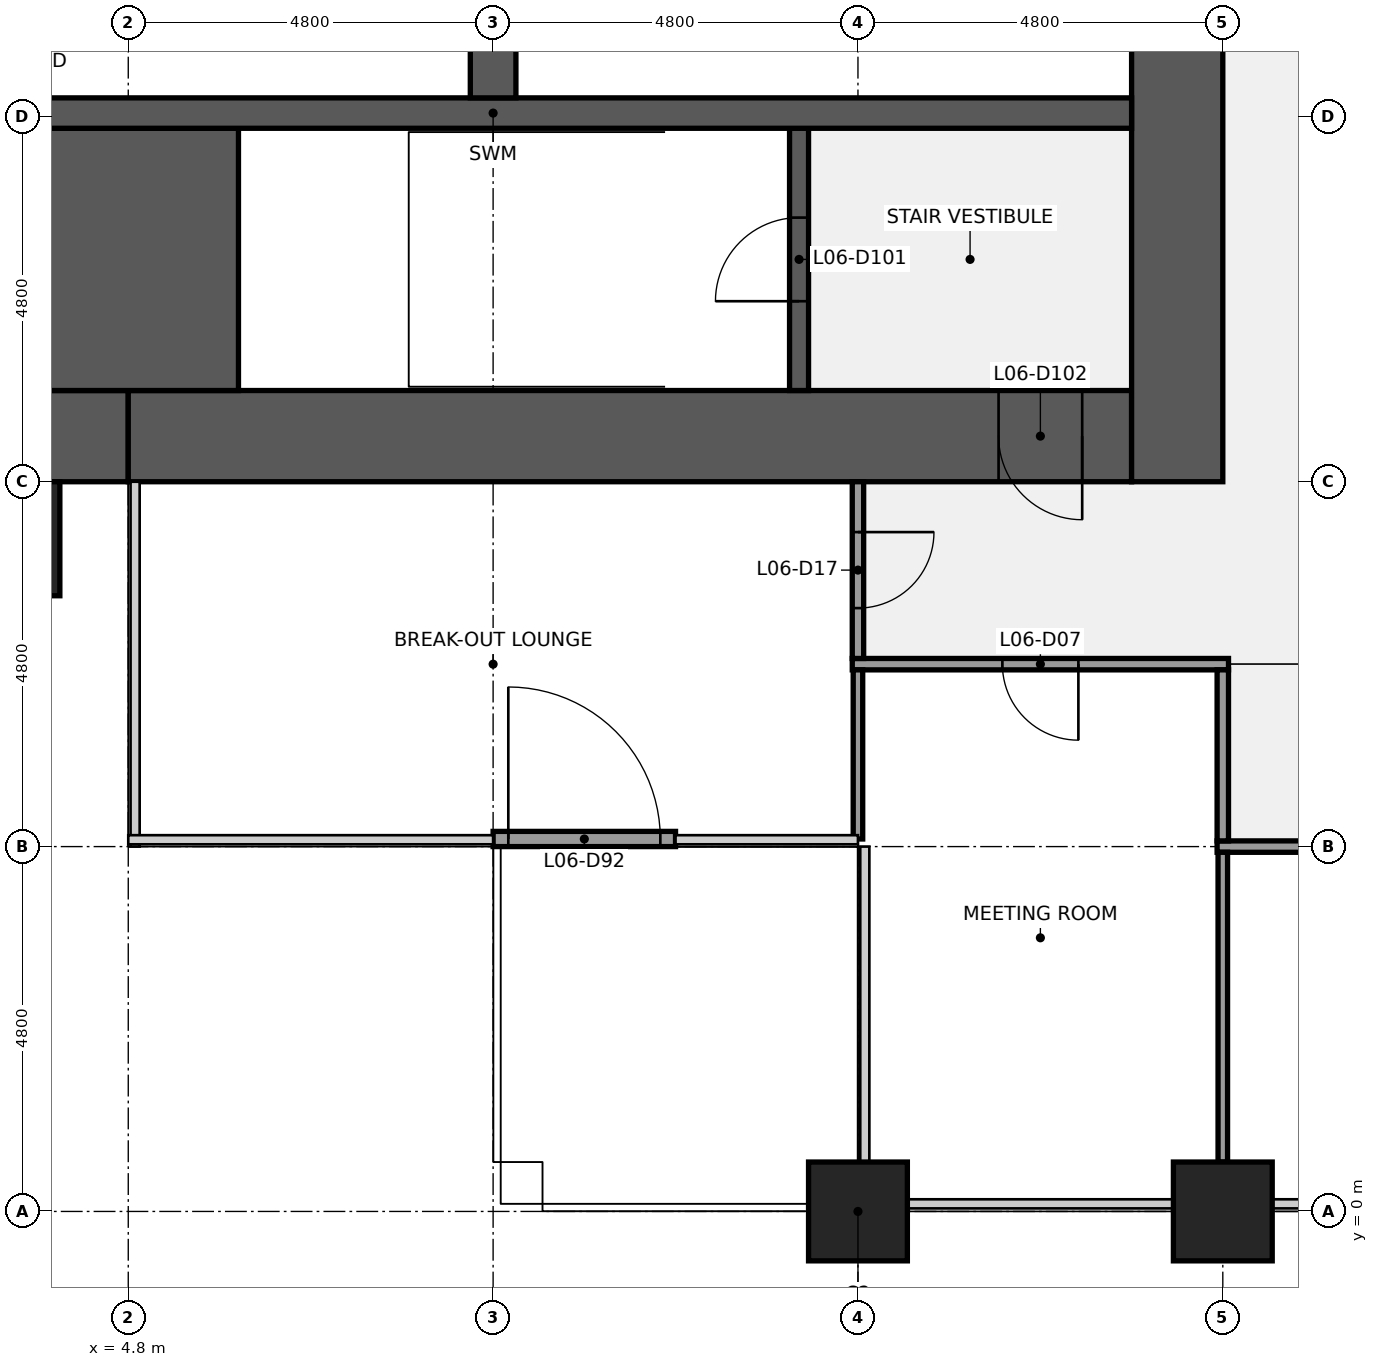
"""IFC4 building model, lengths in metres.
Left out: names, types, materials, properties, quantities, classifications, styles, units other than length and angle.
Written with IfcOpenShell. Run it as: python <this file> out.ifc"""

import sys

from ifc_helpers import new_model, si_unit, direction, frame, frame_2d, origin, origin_2d, place, context, subcontext, project, spatial, rectangle, extrude, element, fill, save


model = new_model("IFC4")
c1 = context("Model", 3, precision=1e-05, world=origin(), true_north=direction((0.0, 1.0)))
c2 = subcontext(c1, "Body", "Model", "MODEL_VIEW")
j1 = project(units=[si_unit("LENGTHUNIT", "METRE"), si_unit("PLANEANGLEUNIT", "RADIAN")], contexts=[c1])
p1 = place(None, origin())
s1 = spatial("IfcSite", under=j1, at=p1, CompositionType="ELEMENT")
p2 = place(p1, origin())
s2 = spatial("IfcBuilding", under=s1, at=p2, CompositionType="ELEMENT")
p3 = place(p2, frame((0.0, 0.0, 34.6)))
s3 = spatial("IfcBuildingStorey", under=s2, at=p3, CompositionType="ELEMENT", Elevation=34.6)
for number, where, z_axis, x_axis in (
    (1, (14.4, 0.0, 0.0), (0.0, 0.0, 1.0), (1.0, 0.0, 0.0)),
    (2, (19.2, 0.0, 0.0), (0.0, 0.0, 1.0), (1.0, 0.0, 0.0)),
):
    element("IfcColumn", number, at=place(p3, frame(where, z_axis=z_axis, x_axis=x_axis)), inside=s3, PredefinedType="COLUMN", context=c2, shape_type="SweptSolid", body=[
        extrude(rectangle(XDim=1.3, YDim=1.3, at=origin_2d()), origin(), (0.0, 0.0, 1.0), 4.4),
    ])
p4 = place(p3, frame((4.8, 10.2, 0.0), z_axis=(0.0, 0.0, 1.0), x_axis=(-1.0, 0.0, 0.0)))
e3 = element("IfcWall", 3, at=p4, inside=s3, PredefinedType="SHEAR", context=c2, shape_type="SweptSolid", body=[
    extrude(rectangle(XDim=3.6, YDim=1.2, at=frame_2d((1.8, 0.0))), origin(), (0.0, 0.0, 1.0), 4.24),
])
p5 = place(p3, frame((18.0, 10.2, 0.0), z_axis=(0.0, 0.0, 1.0), x_axis=(-1.0, 0.0, 0.0)))
e4 = element("IfcWall", 4, at=p5, inside=s3, PredefinedType="SHEAR", context=c2, shape_type="SweptSolid", body=[
    extrude(rectangle(XDim=13.2, YDim=1.2, at=frame_2d((6.6, 0.0))), origin(), (0.0, 0.0, 1.0), 4.24),
])
p6 = place(p5, frame((0.65, 0.0, 0.0)))
e5 = element("IfcOpeningElement", 5, at=p6, cuts=e4, PredefinedType="OPENING", context=c2, shape_type="SweptSolid", body=[
    extrude(rectangle(XDim=1.1, YDim=2.1, at=frame_2d((0.55, 1.05))), frame((0.0, 0.61, 0.0), z_axis=(0.0, -1.0, 0.0), x_axis=(1.0, 0.0, 0.0)), (0.0, 0.0, 1.0), 1.22),
])
p7 = place(p3, frame((18.6, 38.4, 0.0), z_axis=(0.0, 0.0, 1.0), x_axis=(0.0, -1.0, 0.0)))
e6 = element("IfcWall", 6, at=p7, inside=s3, PredefinedType="SHEAR", context=c2, shape_type="SweptSolid", body=[
    extrude(rectangle(XDim=28.8, YDim=1.2, at=frame_2d((14.4, 0.0))), origin(), (0.0, 0.0, 1.0), 4.24),
])
p8 = place(p7, frame((18.3, 0.0, 0.0)))
e7 = element("IfcOpeningElement", 7, at=p8, cuts=e6, PredefinedType="OPENING", context=c2, shape_type="SweptSolid", body=[
    extrude(rectangle(XDim=1.8, YDim=2.1, at=frame_2d((0.9, 1.05))), frame((0.0, 0.61, 0.0), z_axis=(0.0, -1.0, 0.0), x_axis=(1.0, 0.0, 0.0)), (0.0, 0.0, 1.0), 1.22),
])
p9 = place(p7, frame((8.7, 0.0, 0.0)))
e8 = element("IfcOpeningElement", 8, at=p9, cuts=e6, PredefinedType="OPENING", context=c2, shape_type="SweptSolid", body=[
    extrude(rectangle(XDim=1.8, YDim=2.1, at=frame_2d((0.9, 1.05))), frame((0.0, 0.61, 0.0), z_axis=(0.0, -1.0, 0.0), x_axis=(1.0, 0.0, 0.0)), (0.0, 0.0, 1.0), 1.22),
])
p10 = place(p3, frame((1.2, 12.525, 0.0), z_axis=(0.0, 0.0, 1.0), x_axis=(1.0, 0.0, 0.0)))
e9 = element("IfcWall", 9, at=p10, inside=s3, PredefinedType="SHEAR", context=c2, shape_type="SweptSolid", body=[
    extrude(rectangle(XDim=5.05, YDim=3.45, at=frame_2d((2.525, 0.0))), origin(), (0.0, 0.0, 1.0), 4.24),
])
p11 = place(p3, frame((13.625, 10.8, 0.0), z_axis=(0.0, 0.0, 1.0), x_axis=(0.0, 1.0, 0.0)))
e10 = element("IfcWall", 10, at=p11, inside=s3, PredefinedType="SHEAR", context=c2, shape_type="SweptSolid", body=[
    extrude(rectangle(XDim=3.45, YDim=0.25, at=frame_2d((1.725, 0.0))), origin(), (0.0, 0.0, 1.0), 4.24),
])
p12 = place(p11, frame((1.175, 0.0, 0.0)))
e11 = element("IfcOpeningElement", 11, at=p12, cuts=e10, PredefinedType="OPENING", context=c2, shape_type="SweptSolid", body=[
    extrude(rectangle(XDim=1.1, YDim=2.1, at=frame_2d((0.55, 1.05))), frame((0.0, 0.135, 0.0), z_axis=(0.0, -1.0, 0.0), x_axis=(1.0, 0.0, 0.0)), (0.0, 0.0, 1.0), 0.27),
])
p13 = place(p3, frame((1.2, 14.45, 0.0), z_axis=(0.0, 0.0, 1.0), x_axis=(1.0, 0.0, 0.0)))
e12 = element("IfcWall", 12, at=p13, inside=s3, PredefinedType="SHEAR", context=c2, shape_type="SweptSolid", body=[
    extrude(rectangle(XDim=16.8, YDim=0.4, at=frame_2d((8.4, 0.0))), origin(), (0.0, 0.0, 1.0), 4.24),
])
p14 = place(p3, frame((9.6, 14.65, 0.0), z_axis=(0.0, 0.0, 1.0), x_axis=(0.0, 1.0, 0.0)))
e13 = element("IfcWall", 13, at=p14, inside=s3, PredefinedType="SHEAR", context=c2, shape_type="SweptSolid", body=[
    extrude(rectangle(XDim=2.6, YDim=0.6, at=frame_2d((1.3, 0.0))), origin(), (0.0, 0.0, 1.0), 4.24),
])
p15 = place(p3, frame((19.125, 4.8, 0.0), z_axis=(0.0, 0.0, 1.0), x_axis=(1.0, 0.0, 0.0)))
e14 = element("IfcWall", 14, at=p15, inside=s3, PredefinedType="PARTITIONING", context=c2, shape_type="SweptSolid", body=[
    extrude(rectangle(XDim=19.35, YDim=0.15, at=frame_2d((9.675, 0.0))), origin(), (0.0, 0.0, 1.0), 3.27),
])
p16 = place(p15, frame((5.575, 0.0, 0.0)))
e15 = element("IfcOpeningElement", 15, at=p16, cuts=e14, PredefinedType="OPENING", context=c2, shape_type="SweptSolid", body=[
    extrude(rectangle(XDim=1.0, YDim=2.1, at=frame_2d((0.5, 1.05))), frame((0.0, 0.085, 0.0), z_axis=(0.0, -1.0, 0.0), x_axis=(1.0, 0.0, 0.0)), (0.0, 0.0, 1.0), 0.17),
])
p17 = place(p15, frame((13.975, 0.0, 0.0)))
e16 = element("IfcOpeningElement", 16, at=p17, cuts=e14, PredefinedType="OPENING", context=c2, shape_type="SweptSolid", body=[
    extrude(rectangle(XDim=1.0, YDim=2.1, at=frame_2d((0.5, 1.05))), frame((0.0, 0.085, 0.0), z_axis=(0.0, -1.0, 0.0), x_axis=(1.0, 0.0, 0.0)), (0.0, 0.0, 1.0), 0.17),
])
p18 = place(p15, frame((17.575, 0.0, 0.0)))
e17 = element("IfcOpeningElement", 17, at=p18, cuts=e14, PredefinedType="OPENING", context=c2, shape_type="SweptSolid", body=[
    extrude(rectangle(XDim=1.0, YDim=2.1, at=frame_2d((0.5, 1.05))), frame((0.0, 0.085, 0.0), z_axis=(0.0, -1.0, 0.0), x_axis=(1.0, 0.0, 0.0)), (0.0, 0.0, 1.0), 0.17),
])
p19 = place(p3, frame((14.325, 7.2, 0.0), z_axis=(0.0, 0.0, 1.0), x_axis=(1.0, 0.0, 0.0)))
e18 = element("IfcWall", 18, at=p19, inside=s3, PredefinedType="PARTITIONING", context=c2, shape_type="SweptSolid", body=[
    extrude(rectangle(XDim=4.95, YDim=0.15, at=frame_2d((2.475, 0.0))), origin(), (0.0, 0.0, 1.0), 3.27),
])
p20 = place(p19, frame((1.975, 0.0, 0.0)))
e19 = element("IfcOpeningElement", 19, at=p20, cuts=e18, PredefinedType="OPENING", context=c2, shape_type="SweptSolid", body=[
    extrude(rectangle(XDim=1.0, YDim=2.1, at=frame_2d((0.5, 1.05))), frame((0.0, 0.085, 0.0), z_axis=(0.0, -1.0, 0.0), x_axis=(1.0, 0.0, 0.0)), (0.0, 0.0, 1.0), 0.17),
])
p21 = place(p3, frame((14.4, 4.9, 0.0), z_axis=(0.0, 0.0, 1.0), x_axis=(0.0, 1.0, 0.0)))
e20 = element("IfcWall", 20, at=p21, inside=s3, PredefinedType="PARTITIONING", context=c2, shape_type="SweptSolid", body=[
    extrude(rectangle(XDim=2.225, YDim=0.125, at=frame_2d((1.113, 0.0))), origin(), (0.0, 0.0, 1.0), 3.27),
])
p22 = place(p3, frame((14.4, 7.275, 0.0), z_axis=(0.0, 0.0, 1.0), x_axis=(0.0, 1.0, 0.0)))
e21 = element("IfcWall", 21, at=p22, inside=s3, PredefinedType="PARTITIONING", context=c2, shape_type="SweptSolid", body=[
    extrude(rectangle(XDim=2.325, YDim=0.15, at=frame_2d((1.163, 0.0))), origin(), (0.0, 0.0, 1.0), 3.27),
])
p23 = place(p22, frame((0.663, 0.0, 0.0)))
e22 = element("IfcOpeningElement", 22, at=p23, cuts=e21, PredefinedType="OPENING", context=c2, shape_type="SweptSolid", body=[
    extrude(rectangle(XDim=1.0, YDim=2.1, at=frame_2d((0.5, 1.05))), frame((0.0, 0.085, 0.0), z_axis=(0.0, -1.0, 0.0), x_axis=(1.0, 0.0, 0.0)), (0.0, 0.0, 1.0), 0.17),
])
p24 = place(p3, frame((19.2, 0.65, 0.0), z_axis=(0.0, 0.0, 1.0), x_axis=(0.0, 1.0, 0.0)))
e23 = element("IfcWall", 23, at=p24, inside=s3, PredefinedType="PARTITIONING", context=c2, shape_type="SweptSolid", body=[
    extrude(rectangle(XDim=4.075, YDim=0.125, at=frame_2d((2.038, 0.0))), origin(), (0.0, 0.0, 1.0), 3.27),
])
p25 = place(p3, frame((19.2, 4.875, 0.0), z_axis=(0.0, 0.0, 1.0), x_axis=(0.0, 1.0, 0.0)))
e24 = element("IfcWall", 24, at=p25, inside=s3, PredefinedType="PARTITIONING", context=c2, shape_type="SweptSolid", body=[
    extrude(rectangle(XDim=2.25, YDim=0.15, at=frame_2d((1.125, 0.0))), origin(), (0.0, 0.0, 1.0), 3.27),
])
p26 = place(p3, frame((2.4, 8.85, 0.0), z_axis=(0.0, 0.0, 1.0), x_axis=(1.0, 0.0, 0.0)))
e25 = element("IfcColumn", 25, at=p26, inside=s3, PredefinedType="PILASTER", context=c2, shape_type="SweptSolid", body=[
    extrude(rectangle(XDim=3.0, YDim=1.5, at=origin_2d()), origin(), (0.0, 0.0, 1.0), 4.4),
])
p27 = place(p3, frame((9.6, 4.9, 0.0), z_axis=(0.0, 0.0, 1.0), x_axis=(1.0, 0.0, 0.0)))
e26 = element("IfcWall", 26, at=p27, inside=s3, PredefinedType="SOLIDWALL", context=c2, shape_type="SweptSolid", body=[
    extrude(rectangle(XDim=2.4, YDim=0.2, at=frame_2d((1.2, 0.0))), origin(), (0.0, 0.0, 1.0), 4.24),
])
p28 = place(p27, frame((0.2, 0.0, 0.0)))
e27 = element("IfcOpeningElement", 27, at=p28, cuts=e26, PredefinedType="OPENING", context=c2, shape_type="SweptSolid", body=[
    extrude(rectangle(XDim=2.0, YDim=2.1, at=frame_2d((1.0, 1.05))), frame((0.0, 0.11, 0.0), z_axis=(0.0, -1.0, 0.0), x_axis=(1.0, 0.0, 0.0)), (0.0, 0.0, 1.0), 0.22),
])
for number, where, z_axis, x_axis in (
    (28, (14.4, -1.075, 0.0), (0.0, 0.0, 1.0), (1.0, 0.0, 0.0)),
    (29, (19.2, -1.075, 0.0), (0.0, 0.0, 1.0), (1.0, 0.0, 0.0)),
):
    element("IfcColumn", number, at=place(p3, frame(where, z_axis=z_axis, x_axis=x_axis)), inside=s3, PredefinedType="PILASTER", context=c2, shape_type="SweptSolid", body=[
        extrude(rectangle(XDim=4.2, YDim=0.85, at=origin_2d()), origin(), (0.0, 0.0, 1.0), 4.4),
    ])
p29 = place(p12, origin())
e30 = element("IfcDoor", 30, at=p29, inside=s3, OperationType="SINGLE_SWING_LEFT", PredefinedType="DOOR", context=c2, shape_type="SweptSolid", body=[
    extrude(rectangle(XDim=1.1, YDim=2.1, at=frame_2d((0.55, 1.05))), frame((0.0, 0.025, 0.0), z_axis=(0.0, -1.0, 0.0), x_axis=(1.0, 0.0, 0.0)), (0.0, 0.0, 1.0), 0.05),
])
fill(e11, e30)
p30 = place(p6, origin())
e31 = element("IfcDoor", 31, at=p30, inside=s3, OperationType="SINGLE_SWING_LEFT", PredefinedType="DOOR", context=c2, shape_type="SweptSolid", body=[
    extrude(rectangle(XDim=1.1, YDim=2.1, at=frame_2d((0.55, 1.05))), frame((0.0, 0.025, 0.0), z_axis=(0.0, -1.0, 0.0), x_axis=(1.0, 0.0, 0.0)), (0.0, 0.0, 1.0), 0.05),
])
fill(e5, e31)
p31 = place(p20, origin())
e32 = element("IfcDoor", 32, at=p31, inside=s3, OperationType="SINGLE_SWING_RIGHT", PredefinedType="DOOR", context=c2, shape_type="SweptSolid", body=[
    extrude(rectangle(XDim=1.0, YDim=2.1, at=frame_2d((0.5, 1.05))), frame((0.0, 0.025, 0.0), z_axis=(0.0, -1.0, 0.0), x_axis=(1.0, 0.0, 0.0)), (0.0, 0.0, 1.0), 0.05),
])
fill(e19, e32)
p32 = place(p23, origin())
e33 = element("IfcDoor", 33, at=p32, inside=s3, OperationType="SINGLE_SWING_RIGHT", PredefinedType="DOOR", context=c2, shape_type="SweptSolid", body=[
    extrude(rectangle(XDim=1.0, YDim=2.1, at=frame_2d((0.5, 1.05))), frame((0.0, 0.025, 0.0), z_axis=(0.0, -1.0, 0.0), x_axis=(1.0, 0.0, 0.0)), (0.0, 0.0, 1.0), 0.05),
])
fill(e22, e33)
p33 = place(p28, origin())
e34 = element("IfcDoor", 34, at=p33, inside=s3, OperationType="SINGLE_SWING_LEFT", PredefinedType="DOOR", context=c2, shape_type="SweptSolid", body=[
    extrude(rectangle(XDim=2.0, YDim=2.1, at=frame_2d((1.0, 1.05))), frame((0.0, 0.025, 0.0), z_axis=(0.0, -1.0, 0.0), x_axis=(1.0, 0.0, 0.0)), (0.0, 0.0, 1.0), 0.05),
])
fill(e27, e34)
save(model, sys.argv[1])
